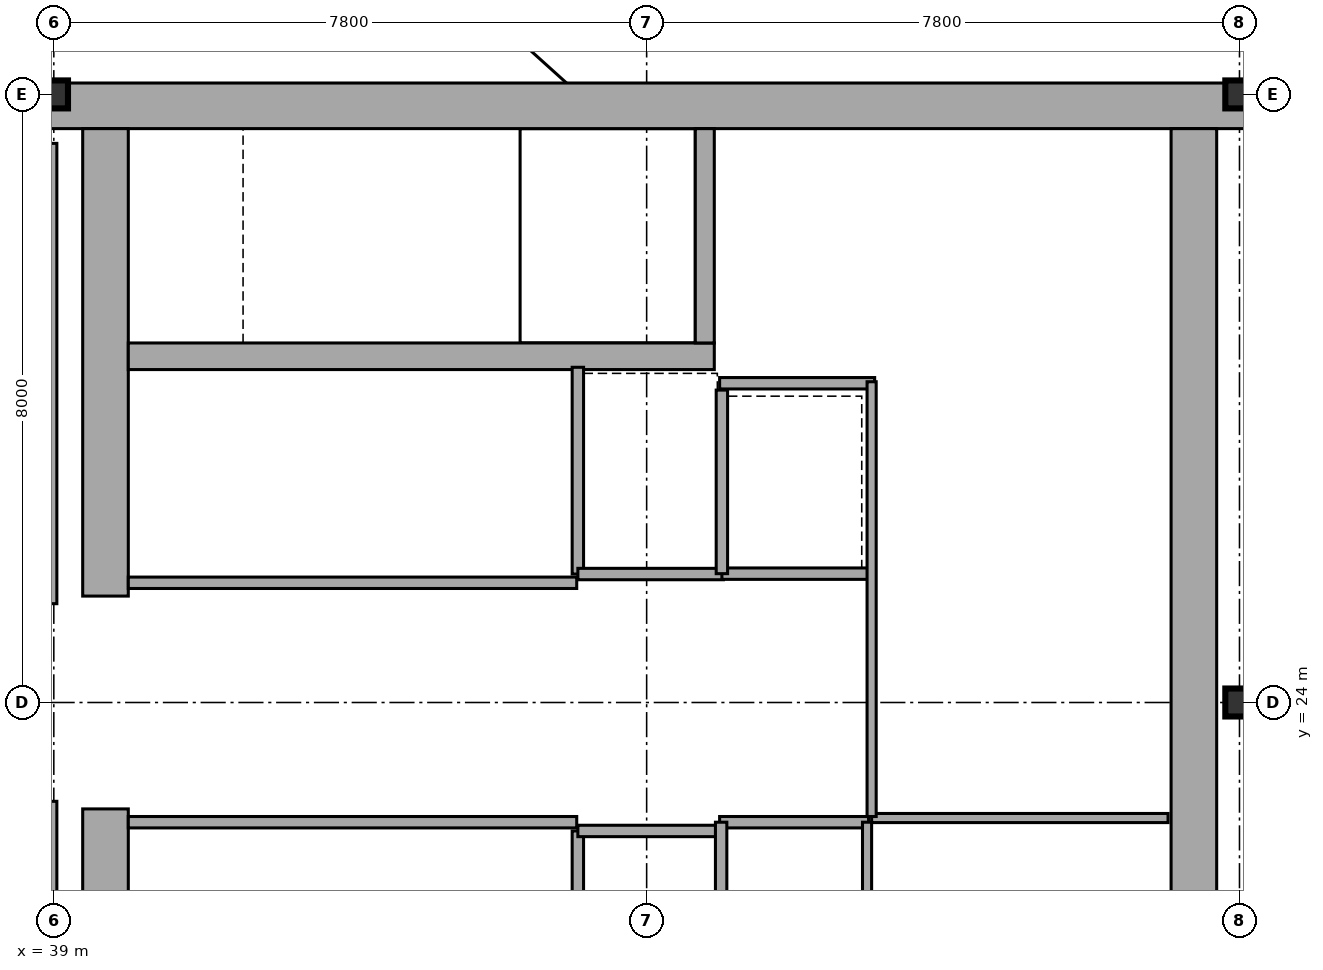
"""IFC4 building model, lengths in metres.
Left out: names, types, materials, properties, quantities, classifications, styles, units other than length and angle.
Written with IfcOpenShell. Run it as: python <this file> out.ifc"""

import sys

from ifc_helpers import new_model, si_unit, direction, frame, frame_2d, origin, origin_2d, place, context, subcontext, project, spatial, rectangle, i_section, extrude, element, fill, save


model = new_model("IFC4")
c1 = context("Model", 3, precision=1e-05, world=origin(), true_north=direction((0.0, 1.0)))
c2 = subcontext(c1, "Body", "Model", "MODEL_VIEW")
j1 = project(units=[si_unit("LENGTHUNIT", "METRE"), si_unit("PLANEANGLEUNIT", "RADIAN")], contexts=[c1])
p1 = place(None, origin())
s1 = spatial("IfcSite", under=j1, at=p1, CompositionType="ELEMENT")
p2 = place(p1, origin())
s2 = spatial("IfcBuilding", under=s1, at=p2, CompositionType="ELEMENT")
p3 = place(p2, frame((0.0, 0.0, 327.6)))
s3 = spatial("IfcBuildingStorey", under=s2, at=p3, CompositionType="ELEMENT", Elevation=327.6)
p4 = place(p3, frame((38.8, 31.85, 0.0), z_axis=(0.0, 0.0, 1.0), x_axis=(1.0, 0.0, 0.0)))
e1 = element("IfcWall", 1, at=p4, inside=s3, PredefinedType="SHEAR", context=c2, shape_type="SweptSolid", body=[
    extrude(rectangle(XDim=16.0, YDim=0.6, at=frame_2d((8.0, 0.0))), origin(), (0.0, 0.0, 1.0), 4.48),
])
for number, where, z_axis, x_axis in (
    (2, (39.68, 16.45, 0.0), (0.0, 0.0, 1.0), (0.0, 1.0, 0.0)),
    (3, (39.68, 25.4, 0.0), (0.0, 0.0, 1.0), (0.0, 1.0, 0.0)),
):
    element("IfcWall", number, at=place(p3, frame(where, z_axis=z_axis, x_axis=x_axis)), inside=s3, PredefinedType="SHEAR", context=c2, shape_type="SweptSolid", body=[
        extrude(rectangle(XDim=6.15, YDim=0.6, at=frame_2d((3.075, 0.0))), origin(), (0.0, 0.0, 1.0), 4.48),
    ])
p5 = place(p3, frame((54.0, 16.45, 0.0), z_axis=(0.0, 0.0, 1.0), x_axis=(0.0, 1.0, 0.0)))
e4 = element("IfcWall", 4, at=p5, inside=s3, PredefinedType="SHEAR", context=c2, shape_type="SweptSolid", body=[
    extrude(rectangle(XDim=15.1, YDim=0.6, at=frame_2d((7.55, 0.0))), origin(), (0.0, 0.0, 1.0), 4.48),
])
p6 = place(p3, frame((39.98, 28.555, 0.0), z_axis=(0.0, 0.0, 1.0), x_axis=(1.0, 0.0, 0.0)))
e5 = element("IfcWall", 5, at=p6, inside=s3, PredefinedType="SHEAR", context=c2, shape_type="SweptSolid", body=[
    extrude(rectangle(XDim=7.71, YDim=0.35, at=frame_2d((3.855, 0.0))), origin(), (0.0, 0.0, 1.0), 4.48),
])
p7 = place(p6, frame((0.25, 0.0, 0.0)))
e6 = element("IfcOpeningElement", 6, at=p7, cuts=e5, PredefinedType="OPENING", context=c2, shape_type="SweptSolid", body=[
    extrude(rectangle(XDim=1.1, YDim=2.15, at=frame_2d((0.55, 1.075))), frame((0.0, 0.185, 0.0), z_axis=(0.0, -1.0, 0.0), x_axis=(1.0, 0.0, 0.0)), (0.0, 0.0, 1.0), 0.37),
])
p8 = place(p3, frame((47.565, 28.73, 0.0), z_axis=(0.0, 0.0, 1.0), x_axis=(0.0, 1.0, 0.0)))
e7 = element("IfcWall", 7, at=p8, inside=s3, PredefinedType="SHEAR", context=c2, shape_type="SweptSolid", body=[
    extrude(rectangle(XDim=2.82, YDim=0.25, at=frame_2d((1.41, 0.0))), origin(), (0.0, 0.0, 1.0), 4.48),
])
for number, where, z_axis, x_axis in (
    (8, (39.0, 32.0, 0.0), (0.0, 0.0, 1.0), (1.0, 0.0, 0.0)),
    (9, (54.6, 24.0, 0.0), (0.0, 0.0, 1.0), (1.0, 0.0, 0.0)),
    (10, (54.6, 32.0, 0.0), (0.0, 0.0, 1.0), (1.0, 0.0, 0.0)),
):
    element("IfcColumn", number, at=place(p3, frame(where, z_axis=z_axis, x_axis=x_axis)), inside=s3, PredefinedType="COLUMN", context=c2, shape_type="SweptSolid", body=[
        extrude(i_section(OverallWidth=0.373, OverallDepth=0.368, WebThickness=0.015, FlangeThickness=0.024, at=origin_2d()), origin(), (0.0, 0.0, 1.0), 4.794),
    ])
p9 = place(p3, frame((39.98, 25.575, 0.0), z_axis=(0.0, 0.0, 1.0), x_axis=(1.0, 0.0, 0.0)))
e11 = element("IfcWall", 11, at=p9, inside=s3, PredefinedType="PARTITIONING", context=c2, shape_type="SweptSolid", body=[
    extrude(rectangle(XDim=5.9, YDim=0.15, at=frame_2d((2.95, 0.0))), origin(), (0.0, 0.0, 1.0), 4.48),
])
p10 = place(p9, frame((2.35, 0.0, 0.0)))
e12 = element("IfcOpeningElement", 12, at=p10, cuts=e11, PredefinedType="OPENING", context=c2, shape_type="SweptSolid", body=[
    extrude(rectangle(XDim=1.05, YDim=2.15, at=frame_2d((0.525, 1.075))), frame((0.0, 0.085, 0.0), z_axis=(0.0, -1.0, 0.0), x_axis=(1.0, 0.0, 0.0)), (0.0, 0.0, 1.0), 0.17),
])
p11 = place(p3, frame((39.98, 22.425, 0.0), z_axis=(0.0, 0.0, 1.0), x_axis=(1.0, 0.0, 0.0)))
e13 = element("IfcWall", 13, at=p11, inside=s3, PredefinedType="PARTITIONING", context=c2, shape_type="SweptSolid", body=[
    extrude(rectangle(XDim=5.9, YDim=0.15, at=frame_2d((2.95, 0.0))), origin(), (0.0, 0.0, 1.0), 4.48),
])
p12 = place(p11, frame((2.35, 0.0, 0.0)))
e14 = element("IfcOpeningElement", 14, at=p12, cuts=e13, PredefinedType="OPENING", context=c2, shape_type="SweptSolid", body=[
    extrude(rectangle(XDim=1.05, YDim=2.15, at=frame_2d((0.525, 1.075))), frame((0.0, 0.085, 0.0), z_axis=(0.0, -1.0, 0.0), x_axis=(1.0, 0.0, 0.0)), (0.0, 0.0, 1.0), 0.17),
])
p13 = place(p3, frame((45.895, 25.69, 0.0), z_axis=(0.0, 0.0, 1.0), x_axis=(0.0, 1.0, 0.0)))
e15 = element("IfcWall", 15, at=p13, inside=s3, PredefinedType="PARTITIONING", context=c2, shape_type="SweptSolid", body=[
    extrude(rectangle(XDim=2.72, YDim=0.15, at=frame_2d((1.36, 0.0))), origin(), (0.0, 0.0, 1.0), 4.48),
])
p14 = place(p13, frame((0.81, 0.0, 0.0)))
e16 = element("IfcOpeningElement", 16, at=p14, cuts=e15, PredefinedType="OPENING", context=c2, shape_type="SweptSolid", body=[
    extrude(rectangle(XDim=1.1, YDim=2.15, at=frame_2d((0.55, 1.075))), frame((0.0, 0.085, 0.0), z_axis=(0.0, -1.0, 0.0), x_axis=(1.0, 0.0, 0.0)), (0.0, 0.0, 1.0), 0.17),
])
p15 = place(p3, frame((45.895, 25.69, 0.0), z_axis=(0.0, 0.0, 1.0), x_axis=(1.0, 0.0, 0.0)))
e17 = element("IfcWall", 17, at=p15, inside=s3, PredefinedType="PARTITIONING", context=c2, shape_type="SweptSolid", body=[
    extrude(rectangle(XDim=1.915, YDim=0.15, at=frame_2d((0.958, 0.0))), origin(), (0.0, 0.0, 1.0), 4.48),
])
p16 = place(p3, frame((45.895, 19.59, 0.0), z_axis=(0.0, 0.0, 1.0), x_axis=(0.0, 1.0, 0.0)))
e18 = element("IfcWall", 18, at=p16, inside=s3, PredefinedType="PARTITIONING", context=c2, shape_type="SweptSolid", body=[
    extrude(rectangle(XDim=2.72, YDim=0.15, at=frame_2d((1.36, 0.0))), origin(), (0.0, 0.0, 1.0), 4.48),
])
p17 = place(p16, frame((0.81, 0.0, 0.0)))
e19 = element("IfcOpeningElement", 19, at=p17, cuts=e18, PredefinedType="OPENING", context=c2, shape_type="SweptSolid", body=[
    extrude(rectangle(XDim=1.1, YDim=2.15, at=frame_2d((0.55, 1.075))), frame((0.0, 0.085, 0.0), z_axis=(0.0, -1.0, 0.0), x_axis=(1.0, 0.0, 0.0)), (0.0, 0.0, 1.0), 0.17),
])
p18 = place(p3, frame((45.895, 22.31, 0.0), z_axis=(0.0, 0.0, 1.0), x_axis=(1.0, 0.0, 0.0)))
e20 = element("IfcWall", 20, at=p18, inside=s3, PredefinedType="PARTITIONING", context=c2, shape_type="SweptSolid", body=[
    extrude(rectangle(XDim=1.915, YDim=0.15, at=frame_2d((0.958, 0.0))), origin(), (0.0, 0.0, 1.0), 4.48),
])
p19 = place(p3, frame((47.79, 25.695, 0.0), z_axis=(0.0, 0.0, 1.0), x_axis=(1.0, 0.0, 0.0)))
e21 = element("IfcWall", 21, at=p19, inside=s3, PredefinedType="PARTITIONING", context=c2, shape_type="SweptSolid", body=[
    extrude(rectangle(XDim=1.92, YDim=0.15, at=frame_2d((0.96, 0.0))), origin(), (0.0, 0.0, 1.0), 4.48),
])
p20 = place(p19, frame((0.41, 0.0, 0.0)))
e22 = element("IfcOpeningElement", 22, at=p20, cuts=e21, PredefinedType="OPENING", context=c2, shape_type="SweptSolid", body=[
    extrude(rectangle(XDim=1.1, YDim=2.15, at=frame_2d((0.55, 1.075))), frame((0.0, 0.085, 0.0), z_axis=(0.0, -1.0, 0.0), x_axis=(1.0, 0.0, 0.0)), (0.0, 0.0, 1.0), 0.17),
])
p21 = place(p3, frame((47.79, 25.695, 0.0), z_axis=(0.0, 0.0, 1.0), x_axis=(0.0, 1.0, 0.0)))
e23 = element("IfcWall", 23, at=p21, inside=s3, PredefinedType="PARTITIONING", context=c2, shape_type="SweptSolid", body=[
    extrude(rectangle(XDim=2.415, YDim=0.15, at=frame_2d((1.208, 0.0))), origin(), (0.0, 0.0, 1.0), 4.48),
])
p22 = place(p3, frame((47.76, 22.425, 0.0), z_axis=(0.0, 0.0, 1.0), x_axis=(1.0, 0.0, 0.0)))
e24 = element("IfcWall", 24, at=p22, inside=s3, PredefinedType="PARTITIONING", context=c2, shape_type="SweptSolid", body=[
    extrude(rectangle(XDim=1.96, YDim=0.15, at=frame_2d((0.98, 0.0))), origin(), (0.0, 0.0, 1.0), 4.48),
])
p23 = place(p3, frame((47.78, 16.45, 0.0), z_axis=(0.0, 0.0, 1.0), x_axis=(0.0, 1.0, 0.0)))
e25 = element("IfcWall", 25, at=p23, inside=s3, PredefinedType="PARTITIONING", context=c2, shape_type="SweptSolid", body=[
    extrude(rectangle(XDim=5.975, YDim=0.15, at=frame_2d((2.988, 0.0))), origin(), (0.0, 0.0, 1.0), 4.48),
])
p24 = place(p3, frame((49.7, 16.48, 0.0), z_axis=(0.0, 0.0, 1.0), x_axis=(0.0, 1.0, 0.0)))
e26 = element("IfcWall", 26, at=p24, inside=s3, PredefinedType="PARTITIONING", context=c2, shape_type="SweptSolid", body=[
    extrude(rectangle(XDim=5.945, YDim=0.12, at=frame_2d((2.973, 0.0))), origin(), (0.0, 0.0, 1.0), 4.48),
])
p25 = place(p24, frame((1.8, 0.0, 0.0)))
e27 = element("IfcOpeningElement", 27, at=p25, cuts=e26, PredefinedType="OPENING", context=c2, shape_type="SweptSolid", body=[
    extrude(rectangle(XDim=0.85, YDim=2.15, at=frame_2d((0.425, 1.075))), frame((0.0, 0.07, 0.0), z_axis=(0.0, -1.0, 0.0), x_axis=(1.0, 0.0, 0.0)), (0.0, 0.0, 1.0), 0.14),
])
p26 = place(p24, frame((3.85, 0.0, 0.0)))
e28 = element("IfcOpeningElement", 28, at=p26, cuts=e26, PredefinedType="OPENING", context=c2, shape_type="SweptSolid", body=[
    extrude(rectangle(XDim=0.95, YDim=2.15, at=frame_2d((0.475, 1.075))), frame((0.0, 0.07, 0.0), z_axis=(0.0, -1.0, 0.0), x_axis=(1.0, 0.0, 0.0)), (0.0, 0.0, 1.0), 0.14),
])
p27 = place(p3, frame((49.76, 22.48, 0.0), z_axis=(0.0, 0.0, 1.0), x_axis=(1.0, 0.0, 0.0)))
e29 = element("IfcWall", 29, at=p27, inside=s3, PredefinedType="PARTITIONING", context=c2, shape_type="SweptSolid", body=[
    extrude(rectangle(XDim=3.9, YDim=0.12, at=frame_2d((1.95, 0.0))), origin(), (0.0, 0.0, 1.0), 4.48),
])
p28 = place(p27, frame((0.45, 0.0, 0.0)))
e30 = element("IfcOpeningElement", 30, at=p28, cuts=e29, PredefinedType="OPENING", context=c2, shape_type="SweptSolid", body=[
    extrude(rectangle(XDim=0.85, YDim=2.15, at=frame_2d((0.425, 1.075))), frame((0.0, 0.07, 0.0), z_axis=(0.0, -1.0, 0.0), x_axis=(1.0, 0.0, 0.0)), (0.0, 0.0, 1.0), 0.14),
])
p29 = place(p3, frame((47.76, 28.2, 0.0), z_axis=(0.0, 0.0, 1.0), x_axis=(1.0, 0.0, 0.0)))
e31 = element("IfcWall", 31, at=p29, inside=s3, PredefinedType="PARTITIONING", context=c2, shape_type="SweptSolid", body=[
    extrude(rectangle(XDim=2.04, YDim=0.15, at=frame_2d((1.02, 0.0))), origin(), (0.0, 0.0, 1.0), 4.48),
])
p30 = place(p3, frame((49.76, 22.5, 0.0), z_axis=(0.0, 0.0, 1.0), x_axis=(0.0, 1.0, 0.0)))
e32 = element("IfcWall", 32, at=p30, inside=s3, PredefinedType="PARTITIONING", context=c2, shape_type="SweptSolid", body=[
    extrude(rectangle(XDim=5.72, YDim=0.12, at=frame_2d((2.86, 0.0))), origin(), (0.0, 0.0, 1.0), 4.48),
])
p31 = place(p30, frame((0.95, 0.0, 0.0)))
e33 = element("IfcOpeningElement", 33, at=p31, cuts=e32, PredefinedType="OPENING", context=c2, shape_type="SweptSolid", body=[
    extrude(rectangle(XDim=0.95, YDim=2.15, at=frame_2d((0.475, 1.075))), frame((0.0, 0.07, 0.0), z_axis=(0.0, -1.0, 0.0), x_axis=(1.0, 0.0, 0.0)), (0.0, 0.0, 1.0), 0.14),
])
for number, where, z_axis, x_axis in (
    (34, (38.95, 16.644, 0.0), (0.0, 0.0, 1.0), (0.0, 1.0, 0.0)),
    (35, (38.95, 25.3, 0.0), (0.0, 0.0, 1.0), (0.0, 1.0, 0.0)),
):
    element("IfcWall", number, at=place(p3, frame(where, z_axis=z_axis, x_axis=x_axis)), inside=s3, PredefinedType="SOLIDWALL", context=c2, shape_type="SweptSolid", body=[
        extrude(rectangle(XDim=6.056, YDim=0.18, at=frame_2d((3.028, 0.0))), origin(), (0.0, 0.0, 1.0), 4.21),
    ])
p32 = place(p10, origin())
e36 = element("IfcDoor", 36, at=p32, inside=s3, OperationType="SINGLE_SWING_LEFT", PredefinedType="DOOR", context=c2, shape_type="SweptSolid", body=[
    extrude(rectangle(XDim=1.05, YDim=2.15, at=frame_2d((0.525, 1.075))), frame((0.0, 0.025, 0.0), z_axis=(0.0, -1.0, 0.0), x_axis=(1.0, 0.0, 0.0)), (0.0, 0.0, 1.0), 0.05),
])
fill(e12, e36)
p33 = place(p12, frame((1.05, 0.0, 0.0), z_axis=(0.0, 0.0, 1.0), x_axis=(-1.0, 0.0, 0.0)))
e37 = element("IfcDoor", 37, at=p33, inside=s3, OperationType="SINGLE_SWING_RIGHT", PredefinedType="DOOR", context=c2, shape_type="SweptSolid", body=[
    extrude(rectangle(XDim=1.05, YDim=2.15, at=frame_2d((0.525, 1.075))), frame((0.0, 0.025, 0.0), z_axis=(0.0, -1.0, 0.0), x_axis=(1.0, 0.0, 0.0)), (0.0, 0.0, 1.0), 0.05),
])
fill(e14, e37)
p34 = place(p14, frame((1.1, 0.0, 0.0), z_axis=(0.0, 0.0, 1.0), x_axis=(-1.0, 0.0, 0.0)))
e38 = element("IfcDoor", 38, at=p34, inside=s3, OperationType="DOUBLE_DOOR_SLIDING", PredefinedType="DOOR", context=c2, shape_type="SweptSolid", body=[
    extrude(rectangle(XDim=1.1, YDim=2.15, at=frame_2d((0.55, 1.075))), frame((0.0, 0.025, 0.0), z_axis=(0.0, -1.0, 0.0), x_axis=(1.0, 0.0, 0.0)), (0.0, 0.0, 1.0), 0.05),
])
fill(e16, e38)
p35 = place(p20, frame((1.1, 0.0, 0.0), z_axis=(0.0, 0.0, 1.0), x_axis=(-1.0, 0.0, 0.0)))
e39 = element("IfcDoor", 39, at=p35, inside=s3, OperationType="DOUBLE_DOOR_SLIDING", PredefinedType="DOOR", context=c2, shape_type="SweptSolid", body=[
    extrude(rectangle(XDim=1.1, YDim=2.15, at=frame_2d((0.55, 1.075))), frame((0.0, 0.025, 0.0), z_axis=(0.0, -1.0, 0.0), x_axis=(1.0, 0.0, 0.0)), (0.0, 0.0, 1.0), 0.05),
])
fill(e22, e39)
p36 = place(p28, frame((0.85, 0.0, 0.0), z_axis=(0.0, 0.0, 1.0), x_axis=(-1.0, 0.0, 0.0)))
e40 = element("IfcDoor", 40, at=p36, inside=s3, OperationType="SINGLE_SWING_LEFT", PredefinedType="DOOR", context=c2, shape_type="SweptSolid", body=[
    extrude(rectangle(XDim=0.85, YDim=2.15, at=frame_2d((0.425, 1.075))), frame((0.0, 0.025, 0.0), z_axis=(0.0, -1.0, 0.0), x_axis=(1.0, 0.0, 0.0)), (0.0, 0.0, 1.0), 0.05),
])
fill(e30, e40)
p37 = place(p31, origin())
e41 = element("IfcDoor", 41, at=p37, inside=s3, OperationType="SINGLE_SWING_LEFT", PredefinedType="DOOR", context=c2, shape_type="SweptSolid", body=[
    extrude(rectangle(XDim=0.95, YDim=2.15, at=frame_2d((0.475, 1.075))), frame((0.0, 0.025, 0.0), z_axis=(0.0, -1.0, 0.0), x_axis=(1.0, 0.0, 0.0)), (0.0, 0.0, 1.0), 0.05),
])
fill(e33, e41)
p38 = place(p7, origin())
e42 = element("IfcDoor", 42, at=p38, inside=s3, OperationType="SINGLE_SWING_RIGHT", PredefinedType="DOOR", context=c2, shape_type="SweptSolid", body=[
    extrude(rectangle(XDim=1.1, YDim=2.15, at=frame_2d((0.55, 1.075))), frame((0.0, 0.025, 0.0), z_axis=(0.0, -1.0, 0.0), x_axis=(1.0, 0.0, 0.0)), (0.0, 0.0, 1.0), 0.05),
])
fill(e6, e42)
save(model, sys.argv[1])
